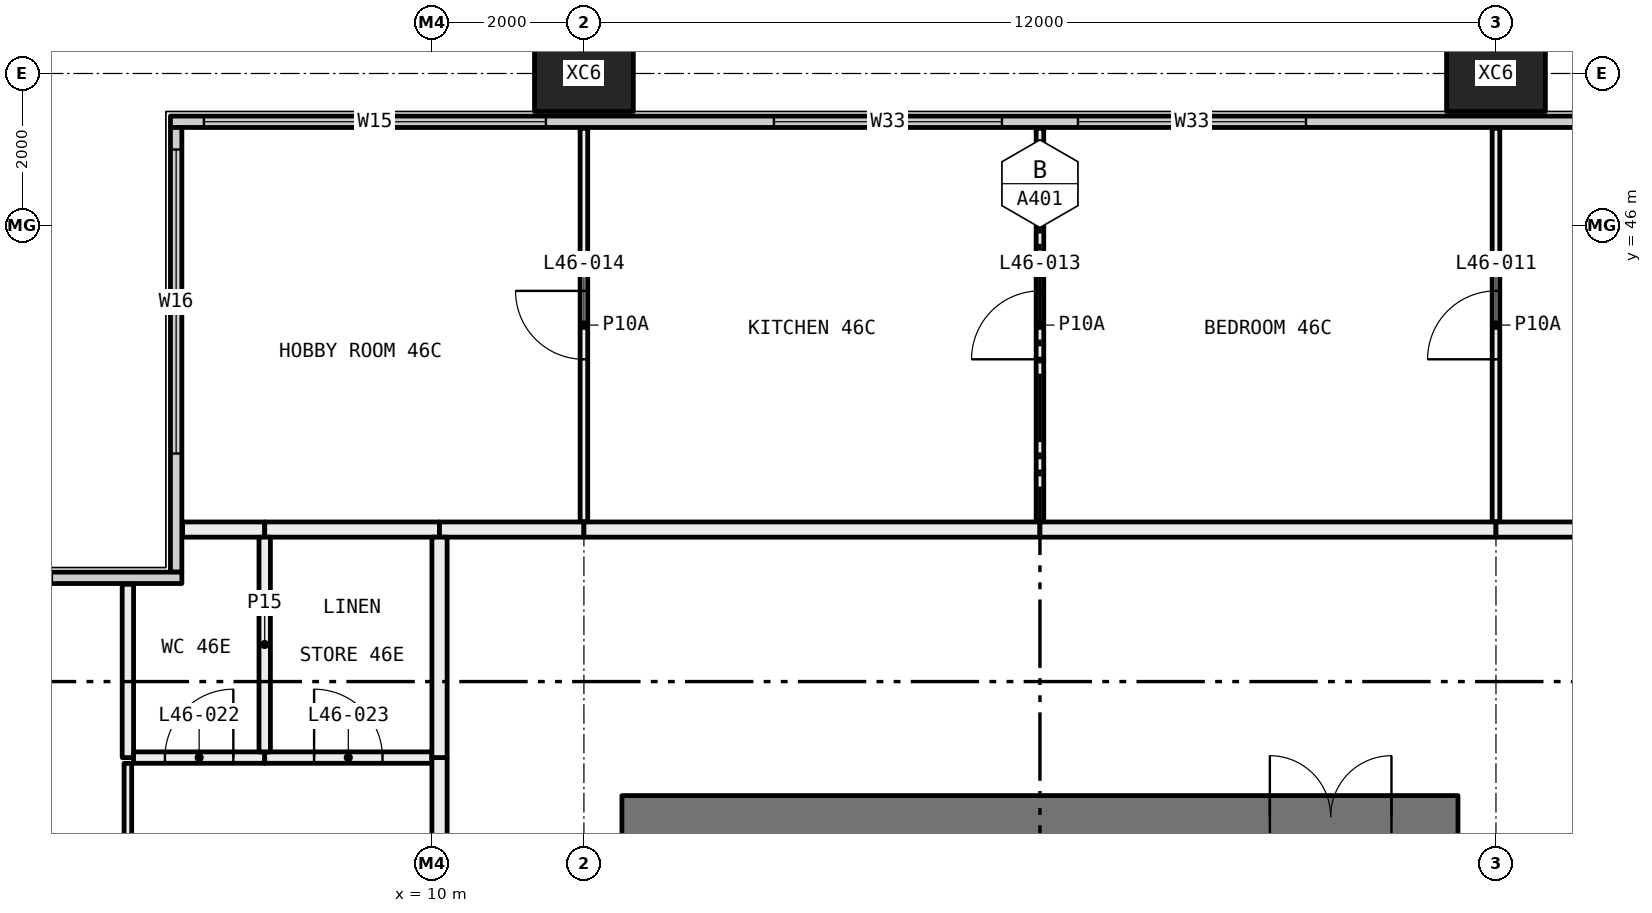
"""IFC4 building model, lengths in metres.
Left out: names, types, materials, properties, quantities, classifications, styles, units other than length and angle.
Written with IfcOpenShell. Run it as: python <this file> out.ifc"""

import sys

from ifc_helpers import new_model, si_unit, direction, frame, frame_2d, origin, origin_2d, place, context, subcontext, project, spatial, rectangle, hollow_rectangle, extrude, element, fill, save


model = new_model("IFC4")
c1 = context("Model", 3, precision=1e-05, world=origin(), true_north=direction((0.0, 1.0)))
c2 = subcontext(c1, "Body", "Model", "MODEL_VIEW")
j1 = project(units=[si_unit("LENGTHUNIT", "METRE"), si_unit("PLANEANGLEUNIT", "RADIAN")], contexts=[c1])
p1 = place(None, origin())
s1 = spatial("IfcSite", under=j1, at=p1, CompositionType="ELEMENT")
p2 = place(p1, origin())
s2 = spatial("IfcBuilding", under=s1, at=p2, CompositionType="ELEMENT")
p3 = place(p2, frame((0.0, 0.0, 175.5)))
s3 = spatial("IfcBuildingStorey", under=s2, at=p3, CompositionType="ELEMENT", Elevation=175.5)
for number, where, z_axis, x_axis in (
    (1, (12.0, 48.0, -0.4), (0.0, 0.0, 1.0), (1.0, 0.0, 0.0)),
    (2, (24.0, 48.0, -0.4), (0.0, 0.0, 1.0), (1.0, 0.0, 0.0)),
):
    element("IfcColumn", number, at=place(p3, frame(where, z_axis=z_axis, x_axis=x_axis)), inside=s3, PredefinedType="COLUMN", context=c2, shape_type="SweptSolid", body=[
        extrude(hollow_rectangle(XDim=1.3, YDim=1.0, WallThickness=0.05, at=origin_2d()), origin(), (0.0, 0.0, 1.0), 3.45),
    ])
p4 = place(p3, frame((6.56, 47.365, 0.0), z_axis=(0.0, 0.0, 1.0), x_axis=(1.0, 0.0, 0.0)))
e3 = element("IfcWall", 3, at=p4, inside=s3, PredefinedType="ELEMENTEDWALL", context=c2, shape_type="SweptSolid", body=[
    extrude(rectangle(XDim=46.88, YDim=0.15, at=frame_2d((23.44, 0.0))), origin(), (0.0, 0.0, 1.0), 3.05),
])
p5 = place(p4, frame((0.44, 0.0, 0.45)))
e4 = element("IfcOpeningElement", 4, at=p5, cuts=e3, PredefinedType="OPENING", context=c2, shape_type="SweptSolid", body=[
    extrude(rectangle(XDim=4.5, YDim=2.55, at=frame_2d((2.25, 1.275))), frame((0.0, 0.085, 0.0), z_axis=(0.0, -1.0, 0.0), x_axis=(1.0, 0.0, 0.0)), (0.0, 0.0, 1.0), 0.17),
])
p6 = place(p4, frame((7.94, 0.0, 0.45)))
e5 = element("IfcOpeningElement", 5, at=p6, cuts=e3, PredefinedType="OPENING", context=c2, shape_type="SweptSolid", body=[
    extrude(rectangle(XDim=3.0, YDim=2.55, at=frame_2d((1.5, 1.275))), frame((0.0, 0.085, 0.0), z_axis=(0.0, -1.0, 0.0), x_axis=(1.0, 0.0, 0.0)), (0.0, 0.0, 1.0), 0.17),
])
p7 = place(p4, frame((11.94, 0.0, 0.45)))
e6 = element("IfcOpeningElement", 6, at=p7, cuts=e3, PredefinedType="OPENING", context=c2, shape_type="SweptSolid", body=[
    extrude(rectangle(XDim=3.0, YDim=2.55, at=frame_2d((1.5, 1.275))), frame((0.0, 0.085, 0.0), z_axis=(0.0, -1.0, 0.0), x_axis=(1.0, 0.0, 0.0)), (0.0, 0.0, 1.0), 0.17),
])
p8 = place(p4, frame((19.94, 0.0, 0.45)))
e7 = element("IfcOpeningElement", 7, at=p8, cuts=e3, PredefinedType="OPENING", context=c2, shape_type="SweptSolid", body=[
    extrude(rectangle(XDim=3.0, YDim=2.55, at=frame_2d((1.5, 1.275))), frame((0.0, 0.085, 0.0), z_axis=(0.0, -1.0, 0.0), x_axis=(1.0, 0.0, 0.0)), (0.0, 0.0, 1.0), 0.17),
])
p9 = place(p4, frame((23.94, 0.0, 0.45)))
e8 = element("IfcOpeningElement", 8, at=p9, cuts=e3, PredefinedType="OPENING", context=c2, shape_type="SweptSolid", body=[
    extrude(rectangle(XDim=2.0, YDim=2.55, at=frame_2d((1.0, 1.275))), frame((0.0, 0.085, 0.0), z_axis=(0.0, -1.0, 0.0), x_axis=(1.0, 0.0, 0.0)), (0.0, 0.0, 1.0), 0.17),
])
p10 = place(p4, frame((31.94, 0.0, 0.45)))
e9 = element("IfcOpeningElement", 9, at=p10, cuts=e3, PredefinedType="OPENING", context=c2, shape_type="SweptSolid", body=[
    extrude(rectangle(XDim=3.0, YDim=2.55, at=frame_2d((1.5, 1.275))), frame((0.0, 0.085, 0.0), z_axis=(0.0, -1.0, 0.0), x_axis=(1.0, 0.0, 0.0)), (0.0, 0.0, 1.0), 0.17),
])
p11 = place(p4, frame((35.94, 0.0, 0.45)))
e10 = element("IfcOpeningElement", 10, at=p11, cuts=e3, PredefinedType="OPENING", context=c2, shape_type="SweptSolid", body=[
    extrude(rectangle(XDim=3.0, YDim=2.55, at=frame_2d((1.5, 1.275))), frame((0.0, 0.085, 0.0), z_axis=(0.0, -1.0, 0.0), x_axis=(1.0, 0.0, 0.0)), (0.0, 0.0, 1.0), 0.17),
])
p12 = place(p4, frame((41.94, 0.0, 0.45)))
e11 = element("IfcOpeningElement", 11, at=p12, cuts=e3, PredefinedType="OPENING", context=c2, shape_type="SweptSolid", body=[
    extrude(rectangle(XDim=4.5, YDim=2.55, at=frame_2d((2.25, 1.275))), frame((0.0, 0.085, 0.0), z_axis=(0.0, -1.0, 0.0), x_axis=(1.0, 0.0, 0.0)), (0.0, 0.0, 1.0), 0.17),
])
p13 = place(p3, frame((6.635, 41.44, 0.0), z_axis=(0.0, 0.0, 1.0), x_axis=(0.0, 1.0, 0.0)))
e12 = element("IfcWall", 12, at=p13, inside=s3, PredefinedType="ELEMENTEDWALL", context=c2, shape_type="SweptSolid", body=[
    extrude(rectangle(XDim=5.85, YDim=0.15, at=frame_2d((2.925, 0.0))), origin(), (0.0, 0.0, 1.0), 3.05),
])
p14 = place(p13, frame((1.56, 0.0, 0.45)))
e13 = element("IfcOpeningElement", 13, at=p14, cuts=e12, PredefinedType="OPENING", context=c2, shape_type="SweptSolid", body=[
    extrude(rectangle(XDim=4.0, YDim=2.55, at=frame_2d((2.0, 1.275))), frame((0.0, 0.085, 0.0), z_axis=(0.0, -1.0, 0.0), x_axis=(1.0, 0.0, 0.0)), (0.0, 0.0, 1.0), 0.17),
])
p15 = place(p3, frame((0.56, 41.365, 0.0), z_axis=(0.0, 0.0, 1.0), x_axis=(1.0, 0.0, 0.0)))
e14 = element("IfcWall", 14, at=p15, inside=s3, PredefinedType="ELEMENTEDWALL", context=c2, shape_type="SweptSolid", body=[
    extrude(rectangle(XDim=6.15, YDim=0.15, at=frame_2d((3.075, 0.0))), origin(), (0.0, 0.0, 1.0), 3.05),
])
p16 = place(p15, frame((0.44, 0.0, 0.45)))
e15 = element("IfcOpeningElement", 15, at=p16, cuts=e14, PredefinedType="OPENING", context=c2, shape_type="SweptSolid", body=[
    extrude(rectangle(XDim=4.0, YDim=2.55, at=frame_2d((2.0, 1.275))), frame((0.0, 0.085, 0.0), z_axis=(0.0, -1.0, 0.0), x_axis=(1.0, 0.0, 0.0)), (0.0, 0.0, 1.0), 0.17),
])
p17 = place(p3, frame((12.0, 42.1, 0.0), z_axis=(0.0, 0.0, 1.0), x_axis=(0.0, 1.0, 0.0)))
e16 = element("IfcWall", 16, at=p17, inside=s3, PredefinedType="PARTITIONING", context=c2, shape_type="SweptSolid", body=[
    extrude(rectangle(XDim=5.18, YDim=0.1, at=frame_2d((2.59, 0.0))), origin(), (0.0, 0.0, 1.0), 3.05),
])
p18 = place(p17, frame((2.14, 0.0, 0.0)))
e17 = element("IfcOpeningElement", 17, at=p18, cuts=e16, PredefinedType="OPENING", context=c2, shape_type="SweptSolid", body=[
    extrude(rectangle(XDim=0.9, YDim=2.1, at=frame_2d((0.45, 1.05))), frame((0.0, 0.06, 0.0), z_axis=(0.0, -1.0, 0.0), x_axis=(1.0, 0.0, 0.0)), (0.0, 0.0, 1.0), 0.12),
])
p19 = place(p3, frame((6.72, 42.0, 0.0), z_axis=(0.0, 0.0, 1.0), x_axis=(1.0, 0.0, 0.0)))
e18 = element("IfcWall", 18, at=p19, inside=s3, PredefinedType="PARTITIONING", context=c2, shape_type="SweptSolid", body=[
    extrude(rectangle(XDim=1.08, YDim=0.2, at=frame_2d((0.54, 0.0))), origin(), (0.0, 0.0, 1.0), 3.05),
])
p20 = place(p3, frame((7.8, 42.0, 0.0), z_axis=(0.0, 0.0, 1.0), x_axis=(1.0, 0.0, 0.0)))
e19 = element("IfcWall", 19, at=p20, inside=s3, PredefinedType="PARTITIONING", context=c2, shape_type="SweptSolid", body=[
    extrude(rectangle(XDim=2.3, YDim=0.2, at=frame_2d((1.15, 0.0))), origin(), (0.0, 0.0, 1.0), 3.05),
])
p21 = place(p3, frame((10.1, 42.0, 0.0), z_axis=(0.0, 0.0, 1.0), x_axis=(1.0, 0.0, 0.0)))
e20 = element("IfcWall", 20, at=p21, inside=s3, PredefinedType="PARTITIONING", context=c2, shape_type="SweptSolid", body=[
    extrude(rectangle(XDim=1.9, YDim=0.2, at=frame_2d((0.95, 0.0))), origin(), (0.0, 0.0, 1.0), 3.05),
])
p22 = place(p3, frame((18.0, 42.1, 0.0), z_axis=(0.0, 0.0, 1.0), x_axis=(0.0, 1.0, 0.0)))
e21 = element("IfcWall", 21, at=p22, inside=s3, PredefinedType="PARTITIONING", context=c2, shape_type="SweptSolid", body=[
    extrude(rectangle(XDim=5.18, YDim=0.1, at=frame_2d((2.59, 0.0))), origin(), (0.0, 0.0, 1.0), 3.05),
])
p23 = place(p22, frame((2.14, 0.0, 0.0)))
e22 = element("IfcOpeningElement", 22, at=p23, cuts=e21, PredefinedType="OPENING", context=c2, shape_type="SweptSolid", body=[
    extrude(rectangle(XDim=0.9, YDim=2.1, at=frame_2d((0.45, 1.05))), frame((0.0, 0.06, 0.0), z_axis=(0.0, -1.0, 0.0), x_axis=(1.0, 0.0, 0.0)), (0.0, 0.0, 1.0), 0.12),
])
p24 = place(p3, frame((12.0, 42.0, 0.0), z_axis=(0.0, 0.0, 1.0), x_axis=(1.0, 0.0, 0.0)))
e23 = element("IfcWall", 23, at=p24, inside=s3, PredefinedType="PARTITIONING", context=c2, shape_type="SweptSolid", body=[
    extrude(rectangle(XDim=6.0, YDim=0.2, at=frame_2d((3.0, 0.0))), origin(), (0.0, 0.0, 1.0), 3.05),
])
p25 = place(p3, frame((24.0, 42.1, 0.0), z_axis=(0.0, 0.0, 1.0), x_axis=(0.0, 1.0, 0.0)))
e24 = element("IfcWall", 24, at=p25, inside=s3, PredefinedType="PARTITIONING", context=c2, shape_type="SweptSolid", body=[
    extrude(rectangle(XDim=5.18, YDim=0.1, at=frame_2d((2.59, 0.0))), origin(), (0.0, 0.0, 1.0), 3.05),
])
p26 = place(p25, frame((2.14, 0.0, 0.0)))
e25 = element("IfcOpeningElement", 25, at=p26, cuts=e24, PredefinedType="OPENING", context=c2, shape_type="SweptSolid", body=[
    extrude(rectangle(XDim=0.9, YDim=2.1, at=frame_2d((0.45, 1.05))), frame((0.0, 0.06, 0.0), z_axis=(0.0, -1.0, 0.0), x_axis=(1.0, 0.0, 0.0)), (0.0, 0.0, 1.0), 0.12),
])
p27 = place(p3, frame((18.0, 42.0, 0.0), z_axis=(0.0, 0.0, 1.0), x_axis=(1.0, 0.0, 0.0)))
e26 = element("IfcWall", 26, at=p27, inside=s3, PredefinedType="PARTITIONING", context=c2, shape_type="SweptSolid", body=[
    extrude(rectangle(XDim=6.0, YDim=0.2, at=frame_2d((3.0, 0.0))), origin(), (0.0, 0.0, 1.0), 3.05),
])
p28 = place(p3, frame((24.0, 42.0, 0.0), z_axis=(0.0, 0.0, 1.0), x_axis=(1.0, 0.0, 0.0)))
e27 = element("IfcWall", 27, at=p28, inside=s3, PredefinedType="PARTITIONING", context=c2, shape_type="SweptSolid", body=[
    extrude(rectangle(XDim=6.0, YDim=0.2, at=frame_2d((3.0, 0.0))), origin(), (0.0, 0.0, 1.0), 3.05),
])
p29 = place(p28, frame((2.5, 0.0, 0.0)))
e28 = element("IfcOpeningElement", 28, at=p29, cuts=e27, PredefinedType="OPENING", context=c2, shape_type="SweptSolid", body=[
    extrude(rectangle(XDim=1.0, YDim=2.1, at=frame_2d((0.5, 1.05))), frame((0.0, 0.11, 0.0), z_axis=(0.0, -1.0, 0.0), x_axis=(1.0, 0.0, 0.0)), (0.0, 0.0, 1.0), 0.22),
])
p30 = place(p3, frame((6.0, 36.05, 0.0), z_axis=(0.0, 0.0, 1.0), x_axis=(0.0, 1.0, 0.0)))
e29 = element("IfcWall", 29, at=p30, inside=s3, PredefinedType="PARTITIONING", context=c2, shape_type="SweptSolid", body=[
    extrude(rectangle(XDim=2.875, YDim=0.1, at=frame_2d((1.438, 0.0))), origin(), (0.0, 0.0, 1.0), 2.45),
])
p31 = place(p3, frame((6.0, 39.0, 0.0), z_axis=(0.0, 0.0, 1.0), x_axis=(0.0, 1.0, 0.0)))
e30 = element("IfcWall", 30, at=p31, inside=s3, PredefinedType="PARTITIONING", context=c2, shape_type="SweptSolid", body=[
    extrude(rectangle(XDim=2.28, YDim=0.15, at=frame_2d((1.14, 0.0))), origin(), (0.0, 0.0, 1.0), 3.05),
])
p32 = place(p3, frame((7.8, 39.0, 0.0), z_axis=(0.0, 0.0, 1.0), x_axis=(-1.0, 0.0, 0.0)))
e31 = element("IfcWall", 31, at=p32, inside=s3, PredefinedType="PARTITIONING", context=c2, shape_type="SweptSolid", body=[
    extrude(rectangle(XDim=1.725, YDim=0.15, at=frame_2d((0.863, 0.0))), origin(), (0.0, 0.0, 1.0), 3.05),
])
p33 = place(p32, frame((0.413, 0.0, 0.0)))
e32 = element("IfcOpeningElement", 32, at=p33, cuts=e31, PredefinedType="OPENING", context=c2, shape_type="SweptSolid", body=[
    extrude(rectangle(XDim=0.9, YDim=2.1, at=frame_2d((0.45, 1.05))), frame((0.0, 0.085, 0.0), z_axis=(0.0, -1.0, 0.0), x_axis=(1.0, 0.0, 0.0)), (0.0, 0.0, 1.0), 0.17),
])
p34 = place(p3, frame((10.0, 39.0, 0.0), z_axis=(0.0, 0.0, 1.0), x_axis=(-1.0, 0.0, 0.0)))
e33 = element("IfcWall", 33, at=p34, inside=s3, PredefinedType="PARTITIONING", context=c2, shape_type="SweptSolid", body=[
    extrude(rectangle(XDim=2.2, YDim=0.15, at=frame_2d((1.1, 0.0))), origin(), (0.0, 0.0, 1.0), 3.05),
])
p35 = place(p34, frame((0.65, 0.0, 0.0)))
e34 = element("IfcOpeningElement", 34, at=p35, cuts=e33, PredefinedType="OPENING", context=c2, shape_type="SweptSolid", body=[
    extrude(rectangle(XDim=0.9, YDim=2.1, at=frame_2d((0.45, 1.05))), frame((0.0, 0.085, 0.0), z_axis=(0.0, -1.0, 0.0), x_axis=(1.0, 0.0, 0.0)), (0.0, 0.0, 1.0), 0.17),
])
p36 = place(p3, frame((10.1, 36.1, 0.0), z_axis=(0.0, 0.0, 1.0), x_axis=(0.0, 1.0, 0.0)))
e35 = element("IfcWall", 35, at=p36, inside=s3, PredefinedType="PARTITIONING", context=c2, shape_type="SweptSolid", body=[
    extrude(rectangle(XDim=2.9, YDim=0.2, at=frame_2d((1.45, 0.0))), origin(), (0.0, 0.0, 1.0), 3.05),
])
p37 = place(p3, frame((7.8, 39.075, 0.0), z_axis=(0.0, 0.0, 1.0), x_axis=(0.0, 1.0, 0.0)))
e36 = element("IfcWall", 36, at=p37, inside=s3, PredefinedType="PARTITIONING", context=c2, shape_type="SweptSolid", body=[
    extrude(rectangle(XDim=2.825, YDim=0.15, at=frame_2d((1.413, 0.0))), origin(), (0.0, 0.0, 1.0), 3.05),
])
p38 = place(p3, frame((10.1, 39.0, 0.0), z_axis=(0.0, 0.0, 1.0), x_axis=(0.0, 1.0, 0.0)))
e37 = element("IfcWall", 37, at=p38, inside=s3, PredefinedType="PARTITIONING", context=c2, shape_type="SweptSolid", body=[
    extrude(rectangle(XDim=2.9, YDim=0.2, at=frame_2d((1.45, 0.0))), origin(), (0.0, 0.0, 1.0), 3.05),
])
p39 = place(p3, frame((12.5, 38.225, 0.0), z_axis=(0.0, 0.0, 1.0), x_axis=(1.0, 0.0, 0.0)))
e38 = element("IfcWall", 38, at=p39, inside=s3, PredefinedType="SHEAR", context=c2, shape_type="SweptSolid", body=[
    extrude(rectangle(XDim=11.0, YDim=0.55, at=frame_2d((5.5, 0.0))), origin(), (0.0, 0.0, 1.0), 3.05),
])
p40 = place(p39, frame((8.525, 0.0, 0.0)))
e39 = element("IfcOpeningElement", 39, at=p40, cuts=e38, PredefinedType="OPENING", context=c2, shape_type="SweptSolid", body=[
    extrude(rectangle(XDim=1.6, YDim=2.1, at=frame_2d((0.8, 1.05))), frame((0.0, 0.285, 0.0), z_axis=(0.0, -1.0, 0.0), x_axis=(1.0, 0.0, 0.0)), (0.0, 0.0, 1.0), 0.57),
])
p41 = place(p5, origin())
e40 = element("IfcWindow", 40, at=p41, inside=s3, PartitioningType="SINGLE_PANEL", PredefinedType="WINDOW", context=c2, shape_type="SweptSolid", body=[
    extrude(rectangle(XDim=4.5, YDim=2.55, at=frame_2d((2.25, 1.275))), frame((0.0, 0.03, 0.0), z_axis=(0.0, -1.0, 0.0), x_axis=(1.0, 0.0, 0.0)), (0.0, 0.0, 1.0), 0.06),
])
fill(e4, e40)
p42 = place(p6, origin())
e41 = element("IfcWindow", 41, at=p42, inside=s3, PartitioningType="SINGLE_PANEL", PredefinedType="WINDOW", context=c2, shape_type="SweptSolid", body=[
    extrude(rectangle(XDim=3.0, YDim=2.55, at=frame_2d((1.5, 1.275))), frame((0.0, 0.03, 0.0), z_axis=(0.0, -1.0, 0.0), x_axis=(1.0, 0.0, 0.0)), (0.0, 0.0, 1.0), 0.06),
])
fill(e5, e41)
p43 = place(p7, origin())
e42 = element("IfcWindow", 42, at=p43, inside=s3, PartitioningType="SINGLE_PANEL", PredefinedType="WINDOW", context=c2, shape_type="SweptSolid", body=[
    extrude(rectangle(XDim=3.0, YDim=2.55, at=frame_2d((1.5, 1.275))), frame((0.0, 0.03, 0.0), z_axis=(0.0, -1.0, 0.0), x_axis=(1.0, 0.0, 0.0)), (0.0, 0.0, 1.0), 0.06),
])
fill(e6, e42)
p44 = place(p14, origin())
e43 = element("IfcWindow", 43, at=p44, inside=s3, PartitioningType="SINGLE_PANEL", PredefinedType="WINDOW", context=c2, shape_type="SweptSolid", body=[
    extrude(rectangle(XDim=4.0, YDim=2.55, at=frame_2d((2.0, 1.275))), frame((0.0, 0.03, 0.0), z_axis=(0.0, -1.0, 0.0), x_axis=(1.0, 0.0, 0.0)), (0.0, 0.0, 1.0), 0.06),
])
fill(e13, e43)
p45 = place(p26, origin())
e44 = element("IfcDoor", 44, at=p45, inside=s3, OperationType="SINGLE_SWING_RIGHT", PredefinedType="DOOR", context=c2, shape_type="SweptSolid", body=[
    extrude(rectangle(XDim=0.9, YDim=2.1, at=frame_2d((0.45, 1.05))), frame((0.0, 0.025, 0.0), z_axis=(0.0, -1.0, 0.0), x_axis=(1.0, 0.0, 0.0)), (0.0, 0.0, 1.0), 0.05),
])
fill(e25, e44)
p46 = place(p23, origin())
e45 = element("IfcDoor", 45, at=p46, inside=s3, OperationType="SINGLE_SWING_RIGHT", PredefinedType="DOOR", context=c2, shape_type="SweptSolid", body=[
    extrude(rectangle(XDim=0.9, YDim=2.1, at=frame_2d((0.45, 1.05))), frame((0.0, 0.025, 0.0), z_axis=(0.0, -1.0, 0.0), x_axis=(1.0, 0.0, 0.0)), (0.0, 0.0, 1.0), 0.05),
])
fill(e22, e45)
p47 = place(p18, origin())
e46 = element("IfcDoor", 46, at=p47, inside=s3, OperationType="SINGLE_SWING_LEFT", PredefinedType="DOOR", context=c2, shape_type="SweptSolid", body=[
    extrude(rectangle(XDim=0.9, YDim=2.1, at=frame_2d((0.45, 1.05))), frame((0.0, 0.025, 0.0), z_axis=(0.0, -1.0, 0.0), x_axis=(1.0, 0.0, 0.0)), (0.0, 0.0, 1.0), 0.05),
])
fill(e17, e46)
p48 = place(p33, frame((0.9, 0.0, 0.0), x_axis=(-1.0, 0.0, 0.0)))
e47 = element("IfcDoor", 47, at=p48, inside=s3, OperationType="SINGLE_SWING_LEFT", PredefinedType="DOOR", context=c2, shape_type="SweptSolid", body=[
    extrude(rectangle(XDim=0.9, YDim=2.1, at=frame_2d((0.45, 1.05))), frame((0.0, 0.025, 0.0), z_axis=(0.0, -1.0, 0.0), x_axis=(1.0, 0.0, 0.0)), (0.0, 0.0, 1.0), 0.05),
])
fill(e32, e47)
p49 = place(p35, frame((0.9, 0.0, 0.0), x_axis=(-1.0, 0.0, 0.0)))
e48 = element("IfcDoor", 48, at=p49, inside=s3, OperationType="SINGLE_SWING_RIGHT", PredefinedType="DOOR", context=c2, shape_type="SweptSolid", body=[
    extrude(rectangle(XDim=0.9, YDim=2.1, at=frame_2d((0.45, 1.05))), frame((0.0, 0.025, 0.0), z_axis=(0.0, -1.0, 0.0), x_axis=(1.0, 0.0, 0.0)), (0.0, 0.0, 1.0), 0.05),
])
fill(e34, e48)
p50 = place(p40, origin())
e49 = element("IfcDoor", 49, at=p50, inside=s3, OperationType="DOUBLE_DOOR_SINGLE_SWING", PredefinedType="DOOR", context=c2, shape_type="SweptSolid", body=[
    extrude(rectangle(XDim=1.6, YDim=2.1, at=frame_2d((0.8, 1.05))), frame((0.0, 0.025, 0.0), z_axis=(0.0, -1.0, 0.0), x_axis=(1.0, 0.0, 0.0)), (0.0, 0.0, 1.0), 0.05),
])
fill(e39, e49)
save(model, sys.argv[1])
